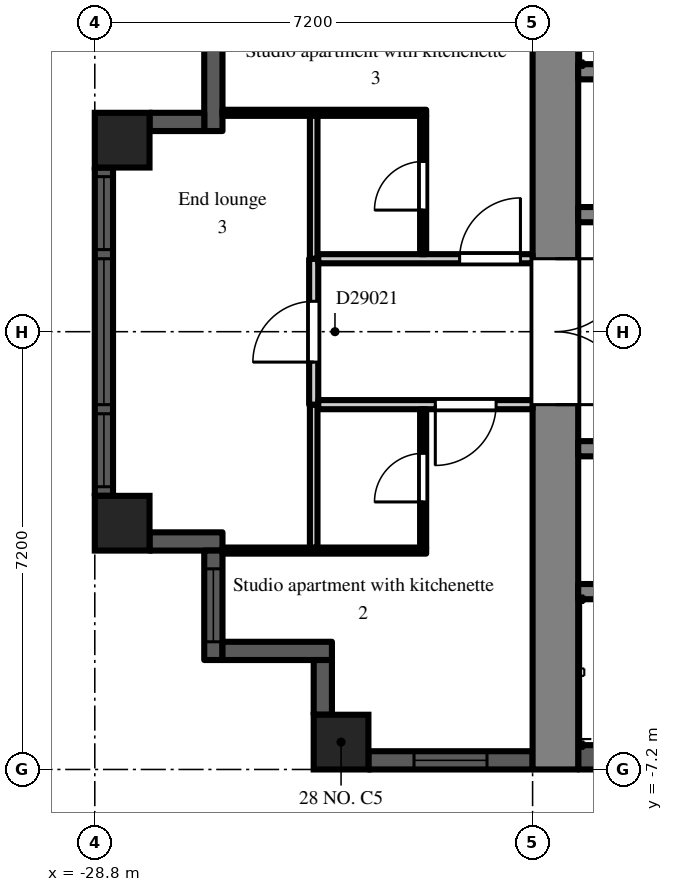
"""IFC4 building model, lengths in metres.
Left out: names, types, materials, properties, quantities, classifications, styles, units other than length and angle.
Written with IfcOpenShell. Run it as: python <this file> out.ifc"""

import sys

from ifc_helpers import new_model, si_unit, direction, frame, frame_2d, origin, origin_2d, place, context, subcontext, project, spatial, rectangle, extrude, element, fill, save


model = new_model("IFC4")
c1 = context("Model", 3, precision=1e-05, world=origin(), true_north=direction((0.0, 1.0)))
c2 = subcontext(c1, "Body", "Model", "MODEL_VIEW")
j1 = project(units=[si_unit("LENGTHUNIT", "METRE"), si_unit("PLANEANGLEUNIT", "RADIAN")], contexts=[c1])
p1 = place(None, origin())
s1 = spatial("IfcSite", under=j1, at=p1, CompositionType="ELEMENT")
p2 = place(p1, origin())
s2 = spatial("IfcBuilding", under=s1, at=p2, CompositionType="ELEMENT")
p3 = place(p2, frame((0.0, 0.0, 201.9)))
s3 = spatial("IfcBuildingStorey", under=s2, at=p3, CompositionType="ELEMENT", Elevation=201.9)
for number, where, z_axis, x_axis in (
    (1, (-28.35, -3.15, 0.0), (0.0, 0.0, 1.0), (1.0, 0.0, 0.0)),
    (2, (-28.35, 3.15, 0.0), (0.0, 0.0, 1.0), (1.0, 0.0, 0.0)),
    (3, (-24.75, -6.75, 0.0), (0.0, 0.0, 1.0), (1.0, 0.0, 0.0)),
):
    element("IfcColumn", number, at=place(p3, frame(where, z_axis=z_axis, x_axis=x_axis)), inside=s3, PredefinedType="COLUMN", context=c2, shape_type="SweptSolid", body=[
        extrude(rectangle(XDim=0.9, YDim=0.9, at=origin_2d()), origin(), (0.0, 0.0, 1.0), 3.0),
    ])
p4 = place(p3, frame((-26.85, 5.1, 0.0), z_axis=(0.0, 0.0, 1.0), x_axis=(0.0, -1.0, 0.0)))
e4 = element("IfcWall", 4, at=p4, inside=s3, PredefinedType="SOLIDWALL", context=c2, shape_type="SweptSolid", body=[
    extrude(rectangle(XDim=1.8, YDim=0.3, at=frame_2d((0.9, 0.0))), origin(), (0.0, 0.0, 1.0), 2.6),
])
p5 = place(p3, frame((-27.0, 3.45, 0.0), z_axis=(0.0, 0.0, 1.0), x_axis=(-1.0, 0.0, 0.0)))
e5 = element("IfcWall", 5, at=p5, inside=s3, PredefinedType="SOLIDWALL", context=c2, shape_type="SweptSolid", body=[
    extrude(rectangle(XDim=0.9, YDim=0.3, at=frame_2d((0.45, 0.0))), origin(), (0.0, 0.0, 1.0), 2.6),
])
p6 = place(p3, frame((-28.65, 2.7, 0.0), z_axis=(0.0, 0.0, 1.0), x_axis=(0.0, -1.0, 0.0)))
e6 = element("IfcWall", 6, at=p6, inside=s3, PredefinedType="SOLIDWALL", context=c2, shape_type="SweptSolid", body=[
    extrude(rectangle(XDim=5.4, YDim=0.3, at=frame_2d((2.7, 0.0))), origin(), (0.0, 0.0, 1.0), 2.3),
])
p7 = place(p6, frame((1.5, 0.0, 0.2)))
e7 = element("IfcOpeningElement", 7, at=p7, cuts=e6, PredefinedType="OPENING", context=c2, shape_type="SweptSolid", body=[
    extrude(rectangle(XDim=2.4, YDim=1.85, at=frame_2d((1.2, 0.925))), frame((0.0, 0.16, 0.0), z_axis=(0.0, -1.0, 0.0), x_axis=(1.0, 0.0, 0.0)), (0.0, 0.0, 1.0), 0.32),
])
p8 = place(p6, frame((0.15, 0.0, 0.2)))
e8 = element("IfcOpeningElement", 8, at=p8, cuts=e6, PredefinedType="OPENING", context=c2, shape_type="SweptSolid", body=[
    extrude(rectangle(XDim=1.2, YDim=1.85, at=frame_2d((0.6, 0.925))), frame((0.0, 0.16, 0.0), z_axis=(0.0, -1.0, 0.0), x_axis=(1.0, 0.0, 0.0)), (0.0, 0.0, 1.0), 0.32),
])
p9 = place(p6, frame((4.05, 0.0, 0.2)))
e9 = element("IfcOpeningElement", 9, at=p9, cuts=e6, PredefinedType="OPENING", context=c2, shape_type="SweptSolid", body=[
    extrude(rectangle(XDim=1.2, YDim=1.85, at=frame_2d((0.6, 0.925))), frame((0.0, 0.16, 0.0), z_axis=(0.0, -1.0, 0.0), x_axis=(1.0, 0.0, 0.0)), (0.0, 0.0, 1.0), 0.32),
])
p10 = place(p3, frame((-27.9, -3.45, 0.0), z_axis=(0.0, 0.0, 1.0), x_axis=(1.0, 0.0, 0.0)))
e10 = element("IfcWall", 10, at=p10, inside=s3, PredefinedType="SOLIDWALL", context=c2, shape_type="SweptSolid", body=[
    extrude(rectangle(XDim=1.2, YDim=0.3, at=frame_2d((0.6, 0.0))), origin(), (0.0, 0.0, 1.0), 2.6),
])
p11 = place(p3, frame((-26.85, -3.6, 0.0), z_axis=(0.0, 0.0, 1.0), x_axis=(0.0, -1.0, 0.0)))
e11 = element("IfcWall", 11, at=p11, inside=s3, PredefinedType="SOLIDWALL", context=c2, shape_type="SweptSolid", body=[
    extrude(rectangle(XDim=1.8, YDim=0.3, at=frame_2d((0.9, 0.0))), origin(), (0.0, 0.0, 1.0), 2.6),
])
p12 = place(p11, frame((0.3, 0.0, 0.2)))
e12 = element("IfcOpeningElement", 12, at=p12, cuts=e11, PredefinedType="OPENING", context=c2, shape_type="SweptSolid", body=[
    extrude(rectangle(XDim=1.2, YDim=1.85, at=frame_2d((0.6, 0.925))), frame((0.0, 0.16, 0.0), z_axis=(0.0, -1.0, 0.0), x_axis=(1.0, 0.0, 0.0)), (0.0, 0.0, 1.0), 0.32),
])
p13 = place(p3, frame((-26.7, -5.25, 0.0), z_axis=(0.0, 0.0, 1.0), x_axis=(1.0, 0.0, 0.0)))
e13 = element("IfcWall", 13, at=p13, inside=s3, PredefinedType="SOLIDWALL", context=c2, shape_type="SweptSolid", body=[
    extrude(rectangle(XDim=1.8, YDim=0.3, at=frame_2d((0.9, 0.0))), origin(), (0.0, 0.0, 1.0), 2.6),
])
p14 = place(p3, frame((-25.05, -5.4, 0.0), z_axis=(0.0, 0.0, 1.0), x_axis=(0.0, -1.0, 0.0)))
e14 = element("IfcWall", 14, at=p14, inside=s3, PredefinedType="SOLIDWALL", context=c2, shape_type="SweptSolid", body=[
    extrude(rectangle(XDim=0.9, YDim=0.3, at=frame_2d((0.45, 0.0))), origin(), (0.0, 0.0, 1.0), 2.6),
])
p15 = place(p3, frame((-24.3, -7.05, 0.0), z_axis=(0.0, 0.0, 1.0), x_axis=(1.0, 0.0, 0.0)))
e15 = element("IfcWall", 15, at=p15, inside=s3, PredefinedType="SOLIDWALL", context=c2, shape_type="SweptSolid", body=[
    extrude(rectangle(XDim=2.7, YDim=0.3, at=frame_2d((1.35, 0.0))), origin(), (0.0, 0.0, 1.0), 2.3),
])
p16 = place(p15, frame((0.75, 0.0, 0.2)))
e16 = element("IfcOpeningElement", 16, at=p16, cuts=e15, PredefinedType="OPENING", context=c2, shape_type="SweptSolid", body=[
    extrude(rectangle(XDim=1.2, YDim=1.85, at=frame_2d((0.6, 0.925))), frame((0.0, 0.16, 0.0), z_axis=(0.0, -1.0, 0.0), x_axis=(1.0, 0.0, 0.0)), (0.0, 0.0, 1.0), 0.32),
])
p17 = place(p3, frame((-21.225, -7.2, 0.0), z_axis=(0.0, 0.0, 1.0), x_axis=(0.0, 1.0, 0.0)))
e17 = element("IfcWall", 17, at=p17, inside=s3, PredefinedType="SHEAR", context=c2, shape_type="SweptSolid", body=[
    extrude(rectangle(XDim=14.4, YDim=0.75, at=frame_2d((7.2, 0.0))), origin(), (0.0, 0.0, 1.0), 2.6),
])
p18 = place(p17, frame((6.0, 0.0, 0.0)))
e18 = element("IfcOpeningElement", 18, at=p18, cuts=e17, PredefinedType="OPENING", context=c2, shape_type="SweptSolid", body=[
    extrude(rectangle(XDim=2.4, YDim=2.2, at=frame_2d((1.2, 1.1))), frame((0.0, 0.385, 0.0), z_axis=(0.0, -1.0, 0.0), x_axis=(1.0, 0.0, 0.0)), (0.0, 0.0, 1.0), 0.77),
])
p19 = place(p3, frame((-7.9, 1.925, 0.0), z_axis=(0.0, 0.0, 1.0), x_axis=(-1.0, 0.0, 0.0)))
e19 = element("IfcWall", 19, at=p19, inside=s3, PredefinedType="SHEAR", context=c2, shape_type="SweptSolid", body=[
    extrude(rectangle(XDim=12.95, YDim=0.25, at=frame_2d((6.475, 0.0))), origin(), (0.0, 0.0, 1.0), 2.6),
])
p20 = place(p19, frame((4.825, 0.0, 0.0)))
e20 = element("IfcOpeningElement", 20, at=p20, cuts=e19, PredefinedType="OPENING", context=c2, shape_type="SweptSolid", body=[
    extrude(rectangle(XDim=1.1, YDim=2.1, at=frame_2d((0.55, 1.05))), frame((0.0, 0.135, 0.0), z_axis=(0.0, -1.0, 0.0), x_axis=(1.0, 0.0, 0.0)), (0.0, 0.0, 1.0), 0.27),
])
p21 = place(p19, frame((7.025, 0.0, 0.0)))
e21 = element("IfcOpeningElement", 21, at=p21, cuts=e19, PredefinedType="OPENING", context=c2, shape_type="SweptSolid", body=[
    extrude(rectangle(XDim=1.1, YDim=2.1, at=frame_2d((0.55, 1.05))), frame((0.0, 0.135, 0.0), z_axis=(0.0, -1.0, 0.0), x_axis=(1.0, 0.0, 0.0)), (0.0, 0.0, 1.0), 0.27),
])
p22 = place(p19, frame((9.225, 0.0, 0.0)))
e22 = element("IfcOpeningElement", 22, at=p22, cuts=e19, PredefinedType="OPENING", context=c2, shape_type="SweptSolid", body=[
    extrude(rectangle(XDim=1.1, YDim=2.1, at=frame_2d((0.55, 1.05))), frame((0.0, 0.135, 0.0), z_axis=(0.0, -1.0, 0.0), x_axis=(1.0, 0.0, 0.0)), (0.0, 0.0, 1.0), 0.27),
])
p23 = place(p19, frame((0.525, 0.0, 0.0)))
e23 = element("IfcOpeningElement", 23, at=p23, cuts=e19, PredefinedType="OPENING", context=c2, shape_type="SweptSolid", body=[
    extrude(rectangle(XDim=0.9, YDim=2.1, at=frame_2d((0.45, 1.05))), frame((0.0, 0.135, 0.0), z_axis=(0.0, -1.0, 0.0), x_axis=(1.0, 0.0, 0.0)), (0.0, 0.0, 1.0), 0.27),
])
p24 = place(p19, frame((2.625, 0.0, 0.0)))
e24 = element("IfcOpeningElement", 24, at=p24, cuts=e19, PredefinedType="OPENING", context=c2, shape_type="SweptSolid", body=[
    extrude(rectangle(XDim=1.1, YDim=2.1, at=frame_2d((0.55, 1.05))), frame((0.0, 0.135, 0.0), z_axis=(0.0, -1.0, 0.0), x_axis=(1.0, 0.0, 0.0)), (0.0, 0.0, 1.0), 0.27),
])
p25 = place(p19, frame((11.525, 0.0, 0.0)))
e25 = element("IfcOpeningElement", 25, at=p25, cuts=e19, PredefinedType="OPENING", context=c2, shape_type="SweptSolid", body=[
    extrude(rectangle(XDim=0.9, YDim=2.1, at=frame_2d((0.45, 1.05))), frame((0.0, 0.135, 0.0), z_axis=(0.0, -1.0, 0.0), x_axis=(1.0, 0.0, 0.0)), (0.0, 0.0, 1.0), 0.27),
])
p26 = place(p3, frame((-12.3, 4.275, 0.0), z_axis=(0.0, 0.0, 1.0), x_axis=(-1.0, 0.0, 0.0)))
e26 = element("IfcWall", 26, at=p26, inside=s3, PredefinedType="SHEAR", context=c2, shape_type="SweptSolid", body=[
    extrude(rectangle(XDim=8.55, YDim=0.25, at=frame_2d((4.275, 0.0))), origin(), (0.0, 0.0, 1.0), 2.6),
])
p27 = place(p3, frame((-7.9, -7.0, 0.0), z_axis=(0.0, 0.0, 1.0), x_axis=(-1.0, 0.0, 0.0)))
e27 = element("IfcWall", 27, at=p27, inside=s3, PredefinedType="SHEAR", context=c2, shape_type="SweptSolid", body=[
    extrude(rectangle(XDim=12.95, YDim=0.4, at=frame_2d((6.475, 0.0))), origin(), (0.0, 0.0, 1.0), 2.6),
])
p28 = place(p3, frame((-7.9, -1.925, 0.0), z_axis=(0.0, 0.0, 1.0), x_axis=(-1.0, 0.0, 0.0)))
e28 = element("IfcWall", 28, at=p28, inside=s3, PredefinedType="SHEAR", context=c2, shape_type="SweptSolid", body=[
    extrude(rectangle(XDim=12.95, YDim=0.25, at=frame_2d((6.475, 0.0))), origin(), (0.0, 0.0, 1.0), 2.6),
])
p29 = place(p28, frame((0.525, 0.0, 0.0)))
e29 = element("IfcOpeningElement", 29, at=p29, cuts=e28, PredefinedType="OPENING", context=c2, shape_type="SweptSolid", body=[
    extrude(rectangle(XDim=0.9, YDim=2.1, at=frame_2d((0.45, 1.05))), frame((0.0, 0.135, 0.0), z_axis=(0.0, -1.0, 0.0), x_axis=(1.0, 0.0, 0.0)), (0.0, 0.0, 1.0), 0.27),
])
p30 = place(p28, frame((2.625, 0.0, 0.0)))
e30 = element("IfcOpeningElement", 30, at=p30, cuts=e28, PredefinedType="OPENING", context=c2, shape_type="SweptSolid", body=[
    extrude(rectangle(XDim=1.1, YDim=2.1, at=frame_2d((0.55, 1.05))), frame((0.0, 0.135, 0.0), z_axis=(0.0, -1.0, 0.0), x_axis=(1.0, 0.0, 0.0)), (0.0, 0.0, 1.0), 0.27),
])
p31 = place(p28, frame((6.025, 0.0, 0.0)))
e31 = element("IfcOpeningElement", 31, at=p31, cuts=e28, PredefinedType="OPENING", context=c2, shape_type="SweptSolid", body=[
    extrude(rectangle(XDim=0.9, YDim=2.1, at=frame_2d((0.45, 1.05))), frame((0.0, 0.135, 0.0), z_axis=(0.0, -1.0, 0.0), x_axis=(1.0, 0.0, 0.0)), (0.0, 0.0, 1.0), 0.27),
])
p32 = place(p28, frame((10.425, 0.0, 0.0)))
e32 = element("IfcOpeningElement", 32, at=p32, cuts=e28, PredefinedType="OPENING", context=c2, shape_type="SweptSolid", body=[
    extrude(rectangle(XDim=0.9, YDim=2.1, at=frame_2d((0.45, 1.05))), frame((0.0, 0.135, 0.0), z_axis=(0.0, -1.0, 0.0), x_axis=(1.0, 0.0, 0.0)), (0.0, 0.0, 1.0), 0.27),
])
p33 = place(p3, frame((-12.3, -4.275, 0.0), z_axis=(0.0, 0.0, 1.0), x_axis=(-1.0, 0.0, 0.0)))
e33 = element("IfcWall", 33, at=p33, inside=s3, PredefinedType="SHEAR", context=c2, shape_type="SweptSolid", body=[
    extrude(rectangle(XDim=8.55, YDim=0.25, at=frame_2d((4.275, 0.0))), origin(), (0.0, 0.0, 1.0), 2.6),
])
for number, where, z_axis, x_axis in (
    (34, (-26.7, -3.6, 0.0), (0.0, 0.0, 1.0), (1.0, 0.0, 0.0)),
    (35, (-26.7, 3.6, 0.0), (0.0, 0.0, 1.0), (1.0, 0.0, 0.0)),
):
    element("IfcWall", number, at=place(p3, frame(where, z_axis=z_axis, x_axis=x_axis)), inside=s3, PredefinedType="PARTITIONING", context=c2, shape_type="SweptSolid", body=[
        extrude(rectangle(XDim=3.35, YDim=0.1, at=frame_2d((1.675, 0.0))), origin(), (0.0, 0.0, 1.0), 2.6),
    ])
p34 = place(p3, frame((-25.2, -3.55, 0.0), z_axis=(0.0, 0.0, 1.0), x_axis=(0.0, 1.0, 0.0)))
e36 = element("IfcWall", 36, at=p34, inside=s3, PredefinedType="PARTITIONING", context=c2, shape_type="SweptSolid", body=[
    extrude(rectangle(XDim=2.35, YDim=0.125, at=frame_2d((1.175, 0.0))), origin(), (0.0, 0.0, 1.0), 2.6),
])
p35 = place(p3, frame((-25.2, -1.2, 0.0), z_axis=(0.0, 0.0, 1.0), x_axis=(0.0, 1.0, 0.0)))
e37 = element("IfcWall", 37, at=p35, inside=s3, PredefinedType="PARTITIONING", context=c2, shape_type="SweptSolid", body=[
    extrude(rectangle(XDim=2.4, YDim=0.15, at=frame_2d((1.2, 0.0))), origin(), (0.0, 0.0, 1.0), 2.6),
])
p36 = place(p35, frame((0.7, 0.0, 0.0)))
e38 = element("IfcOpeningElement", 38, at=p36, cuts=e37, PredefinedType="OPENING", context=c2, shape_type="SweptSolid", body=[
    extrude(rectangle(XDim=1.0, YDim=2.1, at=frame_2d((0.5, 1.05))), frame((0.0, 0.085, 0.0), z_axis=(0.0, -1.0, 0.0), x_axis=(1.0, 0.0, 0.0)), (0.0, 0.0, 1.0), 0.17),
])
p37 = place(p3, frame((-25.125, -1.2, 0.0), z_axis=(0.0, 0.0, 1.0), x_axis=(1.0, 0.0, 0.0)))
e39 = element("IfcWall", 39, at=p37, inside=s3, PredefinedType="PARTITIONING", context=c2, shape_type="SweptSolid", body=[
    extrude(rectangle(XDim=3.525, YDim=0.15, at=frame_2d((1.762, 0.0))), origin(), (0.0, 0.0, 1.0), 2.6),
])
p38 = place(p37, frame((1.925, 0.0, 0.0)))
e40 = element("IfcOpeningElement", 40, at=p38, cuts=e39, PredefinedType="OPENING", context=c2, shape_type="SweptSolid", body=[
    extrude(rectangle(XDim=1.0, YDim=2.1, at=frame_2d((0.5, 1.05))), frame((0.0, 0.085, 0.0), z_axis=(0.0, -1.0, 0.0), x_axis=(1.0, 0.0, 0.0)), (0.0, 0.0, 1.0), 0.17),
])
p39 = place(p3, frame((-25.2, 1.2, 0.0), z_axis=(0.0, 0.0, 1.0), x_axis=(0.0, 1.0, 0.0)))
e41 = element("IfcWall", 41, at=p39, inside=s3, PredefinedType="PARTITIONING", context=c2, shape_type="SweptSolid", body=[
    extrude(rectangle(XDim=2.35, YDim=0.125, at=frame_2d((1.175, 0.0))), origin(), (0.0, 0.0, 1.0), 2.6),
])
p40 = place(p3, frame((-25.125, 1.2, 0.0), z_axis=(0.0, 0.0, 1.0), x_axis=(1.0, 0.0, 0.0)))
e42 = element("IfcWall", 42, at=p40, inside=s3, PredefinedType="PARTITIONING", context=c2, shape_type="SweptSolid", body=[
    extrude(rectangle(XDim=3.525, YDim=0.15, at=frame_2d((1.762, 0.0))), origin(), (0.0, 0.0, 1.0), 2.6),
])
p41 = place(p40, frame((2.325, 0.0, 0.0)))
e43 = element("IfcOpeningElement", 43, at=p41, cuts=e42, PredefinedType="OPENING", context=c2, shape_type="SweptSolid", body=[
    extrude(rectangle(XDim=1.0, YDim=2.1, at=frame_2d((0.5, 1.05))), frame((0.0, 0.085, 0.0), z_axis=(0.0, -1.0, 0.0), x_axis=(1.0, 0.0, 0.0)), (0.0, 0.0, 1.0), 0.17),
])
p42 = place(p3, frame((-23.4, -3.55, 0.0), z_axis=(0.0, 0.0, 1.0), x_axis=(0.0, 1.0, 0.0)))
e44 = element("IfcWall", 44, at=p42, inside=s3, PredefinedType="PARTITIONING", context=c2, shape_type="SweptSolid", body=[
    extrude(rectangle(XDim=2.275, YDim=0.1, at=frame_2d((1.138, 0.0))), origin(), (0.0, 0.0, 1.0), 2.6),
])
p43 = place(p42, frame((0.75, 0.0, 0.0)))
e45 = element("IfcOpeningElement", 45, at=p43, cuts=e44, PredefinedType="OPENING", context=c2, shape_type="SweptSolid", body=[
    extrude(rectangle(XDim=0.8, YDim=2.1, at=frame_2d((0.4, 1.05))), frame((0.0, 0.06, 0.0), z_axis=(0.0, -1.0, 0.0), x_axis=(1.0, 0.0, 0.0)), (0.0, 0.0, 1.0), 0.12),
])
p44 = place(p3, frame((-23.4, 1.275, 0.0), z_axis=(0.0, 0.0, 1.0), x_axis=(0.0, 1.0, 0.0)))
e46 = element("IfcWall", 46, at=p44, inside=s3, PredefinedType="PARTITIONING", context=c2, shape_type="SweptSolid", body=[
    extrude(rectangle(XDim=2.275, YDim=0.1, at=frame_2d((1.138, 0.0))), origin(), (0.0, 0.0, 1.0), 2.6),
])
p45 = place(p44, frame((0.725, 0.0, 0.0)))
e47 = element("IfcOpeningElement", 47, at=p45, cuts=e46, PredefinedType="OPENING", context=c2, shape_type="SweptSolid", body=[
    extrude(rectangle(XDim=0.8, YDim=2.1, at=frame_2d((0.4, 1.05))), frame((0.0, 0.06, 0.0), z_axis=(0.0, -1.0, 0.0), x_axis=(1.0, 0.0, 0.0)), (0.0, 0.0, 1.0), 0.12),
])
p46 = place(p7, origin())
e48 = element("IfcWindow", 48, at=p46, inside=s3, PartitioningType="SINGLE_PANEL", PredefinedType="WINDOW", context=c2, shape_type="SweptSolid", body=[
    extrude(rectangle(XDim=2.4, YDim=1.85, at=frame_2d((1.2, 0.925))), frame((0.0, 0.03, 0.0), z_axis=(0.0, -1.0, 0.0), x_axis=(1.0, 0.0, 0.0)), (0.0, 0.0, 1.0), 0.06),
])
fill(e7, e48)
p47 = place(p8, origin())
e49 = element("IfcWindow", 49, at=p47, inside=s3, PartitioningType="SINGLE_PANEL", PredefinedType="WINDOW", context=c2, shape_type="SweptSolid", body=[
    extrude(rectangle(XDim=1.2, YDim=1.85, at=frame_2d((0.6, 0.925))), frame((0.0, 0.03, 0.0), z_axis=(0.0, -1.0, 0.0), x_axis=(1.0, 0.0, 0.0)), (0.0, 0.0, 1.0), 0.06),
])
fill(e8, e49)
p48 = place(p9, origin())
e50 = element("IfcWindow", 50, at=p48, inside=s3, PartitioningType="SINGLE_PANEL", PredefinedType="WINDOW", context=c2, shape_type="SweptSolid", body=[
    extrude(rectangle(XDim=1.2, YDim=1.85, at=frame_2d((0.6, 0.925))), frame((0.0, 0.03, 0.0), z_axis=(0.0, -1.0, 0.0), x_axis=(1.0, 0.0, 0.0)), (0.0, 0.0, 1.0), 0.06),
])
fill(e9, e50)
p49 = place(p12, origin())
e51 = element("IfcWindow", 51, at=p49, inside=s3, PartitioningType="SINGLE_PANEL", PredefinedType="WINDOW", context=c2, shape_type="SweptSolid", body=[
    extrude(rectangle(XDim=1.2, YDim=1.85, at=frame_2d((0.6, 0.925))), frame((0.0, 0.03, 0.0), z_axis=(0.0, -1.0, 0.0), x_axis=(1.0, 0.0, 0.0)), (0.0, 0.0, 1.0), 0.06),
])
fill(e12, e51)
p50 = place(p16, origin())
e52 = element("IfcWindow", 52, at=p50, inside=s3, PartitioningType="SINGLE_PANEL", PredefinedType="WINDOW", context=c2, shape_type="SweptSolid", body=[
    extrude(rectangle(XDim=1.2, YDim=1.85, at=frame_2d((0.6, 0.925))), frame((0.0, 0.03, 0.0), z_axis=(0.0, -1.0, 0.0), x_axis=(1.0, 0.0, 0.0)), (0.0, 0.0, 1.0), 0.06),
])
fill(e16, e52)
p51 = place(p18, frame((2.4, 0.0, 0.0), z_axis=(0.0, 0.0, 1.0), x_axis=(-1.0, 0.0, 0.0)))
e53 = element("IfcDoor", 53, at=p51, inside=s3, OperationType="DOUBLE_DOOR_DOUBLE_SWING", PredefinedType="DOOR", context=c2, shape_type="SweptSolid", body=[
    extrude(rectangle(XDim=2.4, YDim=2.2, at=frame_2d((1.2, 1.1))), frame((0.0, 0.025, 0.0), z_axis=(0.0, -1.0, 0.0), x_axis=(1.0, 0.0, 0.0)), (0.0, 0.0, 1.0), 0.05),
])
fill(e18, e53)
p52 = place(p36, origin())
e54 = element("IfcDoor", 54, at=p52, inside=s3, OperationType="SINGLE_SWING_LEFT", PredefinedType="DOOR", context=c2, shape_type="SweptSolid", body=[
    extrude(rectangle(XDim=1.0, YDim=2.1, at=frame_2d((0.5, 1.05))), frame((0.0, 0.025, 0.0), z_axis=(0.0, -1.0, 0.0), x_axis=(1.0, 0.0, 0.0)), (0.0, 0.0, 1.0), 0.05),
])
fill(e38, e54)
p53 = place(p43, origin())
e55 = element("IfcDoor", 55, at=p53, inside=s3, OperationType="SINGLE_SWING_LEFT", PredefinedType="DOOR", context=c2, shape_type="SweptSolid", body=[
    extrude(rectangle(XDim=0.8, YDim=2.1, at=frame_2d((0.4, 1.05))), frame((0.0, 0.025, 0.0), z_axis=(0.0, -1.0, 0.0), x_axis=(1.0, 0.0, 0.0)), (0.0, 0.0, 1.0), 0.05),
])
fill(e45, e55)
p54 = place(p38, frame((1.0, 0.0, 0.0), z_axis=(0.0, 0.0, 1.0), x_axis=(-1.0, 0.0, 0.0)))
e56 = element("IfcDoor", 56, at=p54, inside=s3, OperationType="SINGLE_SWING_RIGHT", PredefinedType="DOOR", context=c2, shape_type="SweptSolid", body=[
    extrude(rectangle(XDim=1.0, YDim=2.1, at=frame_2d((0.5, 1.05))), frame((0.0, 0.025, 0.0), z_axis=(0.0, -1.0, 0.0), x_axis=(1.0, 0.0, 0.0)), (0.0, 0.0, 1.0), 0.05),
])
fill(e40, e56)
p55 = place(p45, origin())
e57 = element("IfcDoor", 57, at=p55, inside=s3, OperationType="SINGLE_SWING_LEFT", PredefinedType="DOOR", context=c2, shape_type="SweptSolid", body=[
    extrude(rectangle(XDim=0.8, YDim=2.1, at=frame_2d((0.4, 1.05))), frame((0.0, 0.025, 0.0), z_axis=(0.0, -1.0, 0.0), x_axis=(1.0, 0.0, 0.0)), (0.0, 0.0, 1.0), 0.05),
])
fill(e47, e57)
p56 = place(p41, origin())
e58 = element("IfcDoor", 58, at=p56, inside=s3, OperationType="SINGLE_SWING_RIGHT", PredefinedType="DOOR", context=c2, shape_type="SweptSolid", body=[
    extrude(rectangle(XDim=1.0, YDim=2.1, at=frame_2d((0.5, 1.05))), frame((0.0, 0.025, 0.0), z_axis=(0.0, -1.0, 0.0), x_axis=(1.0, 0.0, 0.0)), (0.0, 0.0, 1.0), 0.05),
])
fill(e43, e58)
save(model, sys.argv[1])
